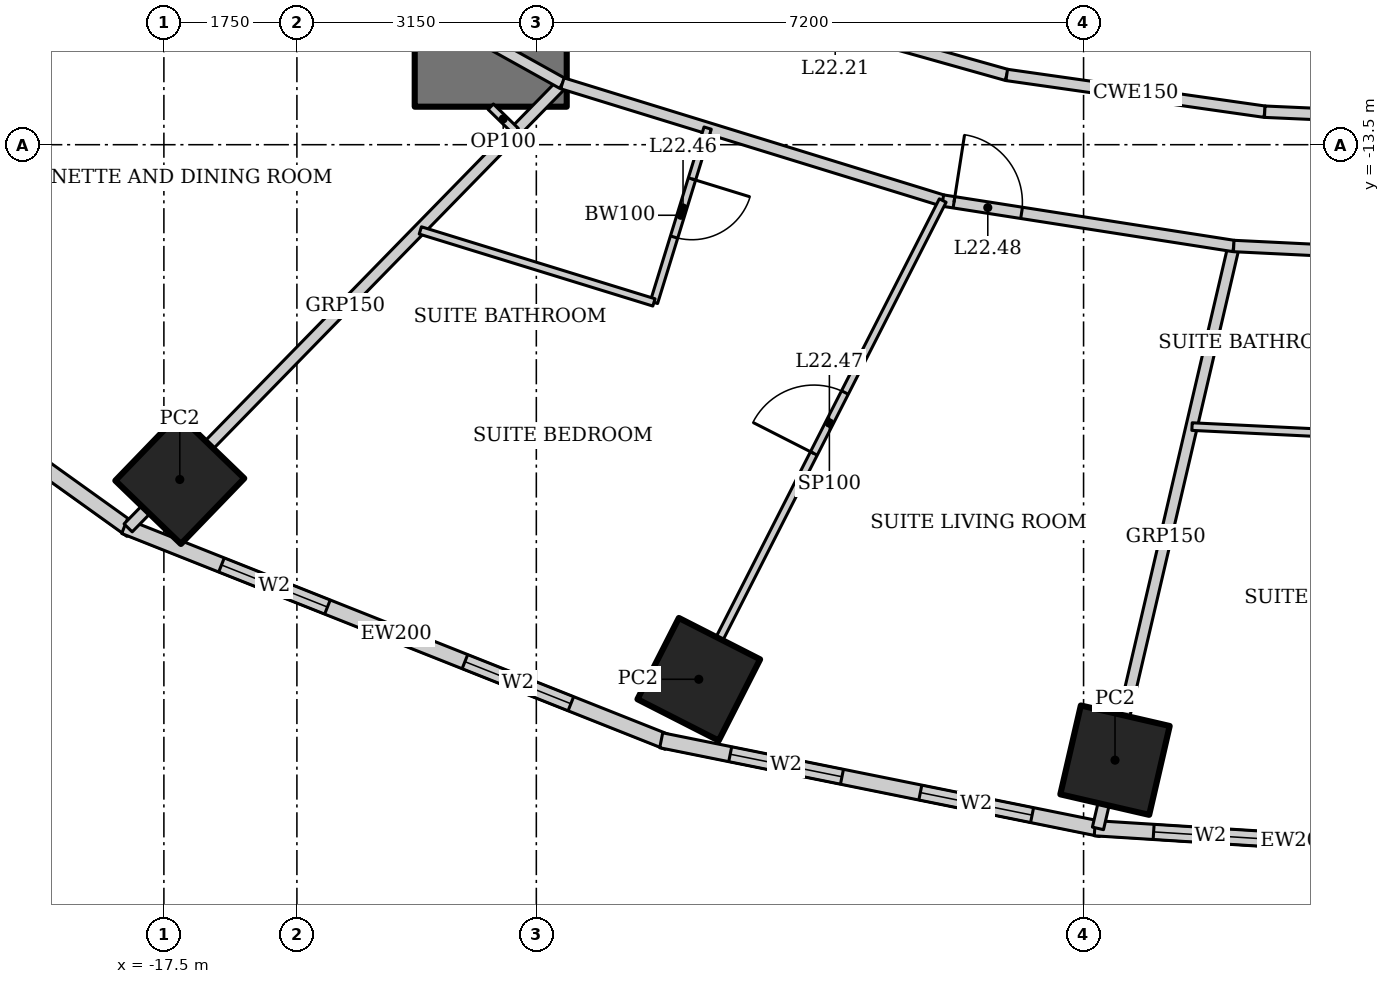
"""IFC4 building model, lengths in metres.
Left out: names, types, materials, properties, quantities, classifications, styles, units other than length and angle.
Written with IfcOpenShell. Run it as: python <this file> out.ifc"""

import sys

from ifc_helpers import new_model, si_unit, direction, frame, frame_2d, origin, origin_2d, place, context, subcontext, project, spatial, rectangle, hollow_rectangle, extrude, element, fill, save


model = new_model("IFC4")
c1 = context("Model", 3, precision=1e-05, world=origin(), true_north=direction((0.0, 1.0)))
c2 = subcontext(c1, "Body", "Model", "MODEL_VIEW")
j1 = project(units=[si_unit("LENGTHUNIT", "METRE"), si_unit("PLANEANGLEUNIT", "RADIAN")], contexts=[c1])
p1 = place(None, origin())
s1 = spatial("IfcSite", under=j1, at=p1, CompositionType="ELEMENT")
p2 = place(p1, origin())
s2 = spatial("IfcBuilding", under=s1, at=p2, CompositionType="ELEMENT")
p3 = place(p2, frame((0.0, 0.0, 94.6)))
s3 = spatial("IfcBuildingStorey", under=s2, at=p3, CompositionType="ELEMENT", Elevation=94.6)
for number, where, z_axis, x_axis in (
    (1, (-17.291, -17.905, 0.0), (0.0, 0.0, 1.0), (0.695, 0.719, 0.0)),
    (2, (-10.463, -20.534, 0.0), (0.0, 0.0, 1.0), (0.454, 0.891, 0.0)),
    (3, (-4.986, -21.598, 0.0), (0.0, 0.0, 1.0), (0.225, 0.974, 0.0)),
):
    element("IfcColumn", number, at=place(p3, frame(where, z_axis=z_axis, x_axis=x_axis)), inside=s3, PredefinedType="COLUMN", context=c2, shape_type="SweptSolid", body=[
        extrude(hollow_rectangle(XDim=1.2, YDim=1.2, WallThickness=0.1, at=origin_2d()), origin(), (0.0, 0.0, 1.0), 3.6),
    ])
p4 = place(p3, frame((-13.2, 13.0, 0.0), z_axis=(0.0, 0.0, 1.0), x_axis=(0.0, -1.0, 0.0)))
e4 = element("IfcWall", 4, at=p4, inside=s3, PredefinedType="SHEAR", context=c2, shape_type="SweptSolid", body=[
    extrude(rectangle(XDim=26.0, YDim=2.0, at=frame_2d((13.0, 0.0))), origin(), (0.0, 0.0, 1.0), 3.6),
])
p5 = place(p4, frame((12.1, 0.0, 0.0)))
e5 = element("IfcOpeningElement", 5, at=p5, cuts=e4, PredefinedType="OPENING", context=c2, shape_type="SweptSolid", body=[
    extrude(rectangle(XDim=1.8, YDim=2.1, at=frame_2d((0.9, 1.05))), frame((0.0, 1.01, 0.0), z_axis=(0.0, -1.0, 0.0), x_axis=(1.0, 0.0, 0.0)), (0.0, 0.0, 1.0), 2.02),
])
p6 = place(p3, frame((-24.482, -13.875, 0.0), z_axis=(0.0, 0.0, 1.0), x_axis=(0.812791321576, -0.582554948112, 0.0)))
e6 = element("IfcWall", 6, at=p6, inside=s3, PredefinedType="SOLIDWALL", context=c2, shape_type="SweptSolid", body=[
    extrude(rectangle(XDim=8.063, YDim=0.2, at=frame_2d((4.032, 0.0))), origin(), (0.0, 0.0, 1.0), 3.45),
])
p7 = place(p6, frame((1.466, 0.0, 0.5)))
e7 = element("IfcOpeningElement", 7, at=p7, cuts=e6, PredefinedType="OPENING", context=c2, shape_type="SweptSolid", body=[
    extrude(rectangle(XDim=1.5, YDim=2.2, at=frame_2d((0.75, 1.1))), frame((0.0, 0.11, 0.0), z_axis=(0.0, -1.0, 0.0), x_axis=(1.0, 0.0, 0.0)), (0.0, 0.0, 1.0), 0.22),
])
p8 = place(p6, frame((5.097, 0.0, 0.5)))
e8 = element("IfcOpeningElement", 8, at=p8, cuts=e6, PredefinedType="OPENING", context=c2, shape_type="SweptSolid", body=[
    extrude(rectangle(XDim=1.5, YDim=2.2, at=frame_2d((0.75, 1.1))), frame((0.0, 0.11, 0.0), z_axis=(0.0, -1.0, 0.0), x_axis=(1.0, 0.0, 0.0)), (0.0, 0.0, 1.0), 0.22),
])
p9 = place(p3, frame((-18.018, -18.523, 0.0), z_axis=(0.0, 0.0, 1.0), x_axis=(0.929358351251, -0.369178892895, 0.0)))
e9 = element("IfcWall", 9, at=p9, inside=s3, PredefinedType="SOLIDWALL", context=c2, shape_type="SweptSolid", body=[
    extrude(rectangle(XDim=7.692, YDim=0.2, at=frame_2d((3.846, 0.0))), origin(), (0.0, 0.0, 1.0), 3.45),
])
p10 = place(p9, frame((1.373, 0.0, 0.5)))
e10 = element("IfcOpeningElement", 10, at=p10, cuts=e9, PredefinedType="OPENING", context=c2, shape_type="SweptSolid", body=[
    extrude(rectangle(XDim=1.5, YDim=2.2, at=frame_2d((0.75, 1.1))), frame((0.0, 0.11, 0.0), z_axis=(0.0, -1.0, 0.0), x_axis=(1.0, 0.0, 0.0)), (0.0, 0.0, 1.0), 0.22),
])
p11 = place(p9, frame((4.819, 0.0, 0.5)))
e11 = element("IfcOpeningElement", 11, at=p11, cuts=e9, PredefinedType="OPENING", context=c2, shape_type="SweptSolid", body=[
    extrude(rectangle(XDim=1.5, YDim=2.2, at=frame_2d((0.75, 1.1))), frame((0.0, 0.11, 0.0), z_axis=(0.0, -1.0, 0.0), x_axis=(1.0, 0.0, 0.0)), (0.0, 0.0, 1.0), 0.22),
])
p12 = place(p3, frame((-10.957, -21.337, 0.0), z_axis=(0.0, 0.0, 1.0), x_axis=(0.980251657452, -0.197754110105, 0.0)))
e12 = element("IfcWall", 12, at=p12, inside=s3, PredefinedType="SOLIDWALL", context=c2, shape_type="SweptSolid", body=[
    extrude(rectangle(XDim=5.904, YDim=0.2, at=frame_2d((2.952, 0.0))), origin(), (0.0, 0.0, 1.0), 3.45),
])
p13 = place(p12, frame((0.926, 0.0, 0.5)))
e13 = element("IfcOpeningElement", 13, at=p13, cuts=e12, PredefinedType="OPENING", context=c2, shape_type="SweptSolid", body=[
    extrude(rectangle(XDim=1.5, YDim=2.2, at=frame_2d((0.75, 1.1))), frame((0.0, 0.11, 0.0), z_axis=(0.0, -1.0, 0.0), x_axis=(1.0, 0.0, 0.0)), (0.0, 0.0, 1.0), 0.22),
])
p14 = place(p12, frame((3.478, 0.0, 0.5)))
e14 = element("IfcOpeningElement", 14, at=p14, cuts=e12, PredefinedType="OPENING", context=c2, shape_type="SweptSolid", body=[
    extrude(rectangle(XDim=1.5, YDim=2.2, at=frame_2d((0.75, 1.1))), frame((0.0, 0.11, 0.0), z_axis=(0.0, -1.0, 0.0), x_axis=(1.0, 0.0, 0.0)), (0.0, 0.0, 1.0), 0.22),
])
p15 = place(p3, frame((-5.253, -22.493, 0.0), z_axis=(0.0, 0.0, 1.0), x_axis=(0.998018582375, -0.062919863585, 0.0)))
e15 = element("IfcWall", 15, at=p15, inside=s3, PredefinedType="SOLIDWALL", context=c2, shape_type="SweptSolid", body=[
    extrude(rectangle(XDim=5.304, YDim=0.2, at=frame_2d((2.652, 0.0))), origin(), (0.0, 0.0, 1.0), 3.45),
])
p16 = place(p15, frame((0.776, 0.0, 0.5)))
e16 = element("IfcOpeningElement", 16, at=p16, cuts=e15, PredefinedType="OPENING", context=c2, shape_type="SweptSolid", body=[
    extrude(rectangle(XDim=1.5, YDim=2.2, at=frame_2d((0.75, 1.1))), frame((0.0, 0.11, 0.0), z_axis=(0.0, -1.0, 0.0), x_axis=(1.0, 0.0, 0.0)), (0.0, 0.0, 1.0), 0.22),
])
p17 = place(p15, frame((3.028, 0.0, 0.5)))
e17 = element("IfcOpeningElement", 17, at=p17, cuts=e15, PredefinedType="OPENING", context=c2, shape_type="SweptSolid", body=[
    extrude(rectangle(XDim=1.5, YDim=2.2, at=frame_2d((0.75, 1.1))), frame((0.0, 0.11, 0.0), z_axis=(0.0, -1.0, 0.0), x_axis=(1.0, 0.0, 0.0)), (0.0, 0.0, 1.0), 0.22),
])
p18 = place(p3, frame((-17.97, -18.542, 0.0), z_axis=(0.0, 0.0, 1.0), x_axis=(0.698757291878, 0.715358823981, 0.0)))
e18 = element("IfcWall", 18, at=p18, inside=s3, PredefinedType="PARTITIONING", context=c2, shape_type="SweptSolid", body=[
    extrude(rectangle(XDim=8.177, YDim=0.15, at=frame_2d((4.088, 0.0))), origin(), (0.0, 0.0, 1.0), 2.528),
])
p19 = place(p3, frame((-5.211, -22.496, 0.0), z_axis=(0.0, 0.0, 1.0), x_axis=(0.227056984461, 0.973881474209, 0.0)))
e19 = element("IfcWall", 19, at=p19, inside=s3, PredefinedType="PARTITIONING", context=c2, shape_type="SweptSolid", body=[
    extrude(rectangle(XDim=7.869, YDim=0.15, at=frame_2d((3.934, 0.0))), origin(), (0.0, 0.0, 1.0), 2.767),
])
p20 = place(p3, frame((-17.299, -9.885, 0.0), z_axis=(0.0, 0.0, 1.0), x_axis=(0.873695910579, -0.486472461541, 0.0)))
e20 = element("IfcWall", 20, at=p20, inside=s3, PredefinedType="PARTITIONING", context=c2, shape_type="SweptSolid", body=[
    extrude(rectangle(XDim=5.771, YDim=0.15, at=frame_2d((2.885, 0.0))), origin(), (0.0, 0.0, 1.0), 3.45),
])
p21 = place(p3, frame((-12.257, -12.693, 0.0), z_axis=(0.0, 0.0, 1.0), x_axis=(0.955657956744, -0.294478980085, 0.0)))
e21 = element("IfcWall", 21, at=p21, inside=s3, PredefinedType="PARTITIONING", context=c2, shape_type="SweptSolid", body=[
    extrude(rectangle(XDim=5.236, YDim=0.15, at=frame_2d((2.618, 0.0))), origin(), (0.0, 0.0, 1.0), 3.45),
])
p22 = place(p3, frame((-7.253, -14.235, 0.0), z_axis=(0.0, 0.0, 1.0), x_axis=(0.988015036573, -0.154357660987, 0.0)))
e22 = element("IfcWall", 22, at=p22, inside=s3, PredefinedType="PARTITIONING", context=c2, shape_type="SweptSolid", body=[
    extrude(rectangle(XDim=3.875, YDim=0.15, at=frame_2d((1.938, 0.0))), origin(), (0.0, 0.0, 1.0), 3.45),
])
p23 = place(p22, frame((0.15, 0.0, 0.0)))
e23 = element("IfcOpeningElement", 23, at=p23, cuts=e22, PredefinedType="OPENING", context=c2, shape_type="SweptSolid", body=[
    extrude(rectangle(XDim=0.9, YDim=2.1, at=frame_2d((0.45, 1.05))), frame((0.0, 0.085, 0.0), z_axis=(0.0, -1.0, 0.0), x_axis=(1.0, 0.0, 0.0)), (0.0, 0.0, 1.0), 0.17),
])
p24 = place(p3, frame((-3.424, -14.833, 0.0), z_axis=(0.0, 0.0, 1.0), x_axis=(0.998809560203, -0.048779733975, 0.0)))
e24 = element("IfcWall", 24, at=p24, inside=s3, PredefinedType="PARTITIONING", context=c2, shape_type="SweptSolid", body=[
    extrude(rectangle(XDim=3.428, YDim=0.15, at=frame_2d((1.714, 0.0))), origin(), (0.0, 0.0, 1.0), 3.45),
])
p25 = place(p3, frame((-10.924, -11.312, 0.0), z_axis=(0.0, 0.0, 1.0), x_axis=(0.962643729928, -0.270771211967, 0.0)))
e25 = element("IfcWall", 25, at=p25, inside=s3, PredefinedType="PARTITIONING", context=c2, shape_type="SweptSolid", body=[
    extrude(rectangle(XDim=4.688, YDim=0.15, at=frame_2d((2.344, 0.0))), origin(), (0.0, 0.0, 1.0), 3.45),
])
p26 = place(p25, frame((1.894, 0.0, 0.0)))
e26 = element("IfcOpeningElement", 26, at=p26, cuts=e25, PredefinedType="OPENING", context=c2, shape_type="SweptSolid", body=[
    extrude(rectangle(XDim=0.9, YDim=2.1, at=frame_2d((0.45, 1.05))), frame((0.0, 0.085, 0.0), z_axis=(0.0, -1.0, 0.0), x_axis=(1.0, 0.0, 0.0)), (0.0, 0.0, 1.0), 0.17),
])
p27 = place(p3, frame((-6.411, -12.582, 0.0), z_axis=(0.0, 0.0, 1.0), x_axis=(0.990002114939, -0.14105251652, 0.0)))
e27 = element("IfcWall", 27, at=p27, inside=s3, PredefinedType="PARTITIONING", context=c2, shape_type="SweptSolid", body=[
    extrude(rectangle(XDim=3.429, YDim=0.15, at=frame_2d((1.714, 0.0))), origin(), (0.0, 0.0, 1.0), 3.45),
])
p28 = place(p3, frame((-23.171, -13.24, 0.0), z_axis=(0.0, 0.0, 1.0), x_axis=(0.868249806728, 0.496127275118, 0.0)))
e28 = element("IfcWall", 28, at=p28, inside=s3, PredefinedType="PARTITIONING", context=c2, shape_type="SweptSolid", body=[
    extrude(rectangle(XDim=6.763, YDim=0.1, at=frame_2d((3.381, 0.0))), origin(), (0.0, 0.0, 1.0), 2.693),
])
p29 = place(p28, frame((2.931, 0.0, 0.0)))
e29 = element("IfcOpeningElement", 29, at=p29, cuts=e28, PredefinedType="OPENING", context=c2, shape_type="SweptSolid", body=[
    extrude(rectangle(XDim=0.9, YDim=2.1, at=frame_2d((0.45, 1.05))), frame((0.0, 0.06, 0.0), z_axis=(0.0, -1.0, 0.0), x_axis=(1.0, 0.0, 0.0)), (0.0, 0.0, 1.0), 0.12),
])
p30 = place(p3, frame((-10.346, -13.281, 0.0), z_axis=(0.0, 0.0, 1.0), x_axis=(-0.294478957423, -0.955657963727, 0.0)))
e30 = element("IfcWall", 30, at=p30, inside=s3, PredefinedType="PARTITIONING", context=c2, shape_type="SweptSolid", body=[
    extrude(rectangle(XDim=2.4, YDim=0.1, at=frame_2d((1.2, 0.0))), origin(), (0.0, 0.0, 1.0), 3.45),
])
p31 = place(p30, frame((0.7, 0.0, 0.0)))
e31 = element("IfcOpeningElement", 31, at=p31, cuts=e30, PredefinedType="OPENING", context=c2, shape_type="SweptSolid", body=[
    extrude(rectangle(XDim=0.8, YDim=2.1, at=frame_2d((0.4, 1.05))), frame((0.0, 0.06, 0.0), z_axis=(0.0, -1.0, 0.0), x_axis=(1.0, 0.0, 0.0)), (0.0, 0.0, 1.0), 0.12),
])
p32 = place(p3, frame((-11.052, -15.575, 0.0), z_axis=(0.0, 0.0, 1.0), x_axis=(-0.955641033268, 0.294533895391, 0.0)))
e32 = element("IfcWall", 32, at=p32, inside=s3, PredefinedType="PARTITIONING", context=c2, shape_type="SweptSolid", body=[
    extrude(rectangle(XDim=3.216, YDim=0.1, at=frame_2d((1.608, 0.0))), origin(), (0.0, 0.0, 1.0), 3.45),
])
p33 = place(p3, frame((-10.236, -20.088, 0.0), z_axis=(0.0, 0.0, 1.0), x_axis=(0.453993694696, 0.89100489627, 0.0)))
e33 = element("IfcWall", 33, at=p33, inside=s3, PredefinedType="PARTITIONING", context=c2, shape_type="SweptSolid", body=[
    extrude(rectangle(XDim=6.57, YDim=0.1, at=frame_2d((3.285, 0.0))), origin(), (0.0, 0.0, 1.0), 2.528),
])
p34 = place(p33, frame((2.835, 0.0, 0.0)))
e34 = element("IfcOpeningElement", 34, at=p34, cuts=e33, PredefinedType="OPENING", context=c2, shape_type="SweptSolid", body=[
    extrude(rectangle(XDim=0.9, YDim=2.1, at=frame_2d((0.45, 1.05))), frame((0.0, 0.06, 0.0), z_axis=(0.0, -1.0, 0.0), x_axis=(1.0, 0.0, 0.0)), (0.0, 0.0, 1.0), 0.12),
])
p35 = place(p3, frame((-1.544, -17.327, 0.0), z_axis=(0.0, 0.0, 1.0), x_axis=(-0.998813899717, 0.048690797202, 0.0)))
e35 = element("IfcWall", 35, at=p35, inside=s3, PredefinedType="PARTITIONING", context=c2, shape_type="SweptSolid", body=[
    extrude(rectangle(XDim=2.432, YDim=0.1, at=frame_2d((1.216, 0.0))), origin(), (0.0, 0.0, 1.0), 3.45),
])
p36 = place(p3, frame((-13.2, -13.0, 0.0), z_axis=(0.0, 0.0, 1.0), x_axis=(0.715289751842, -0.698827998087, 0.0)))
e36 = element("IfcWall", 36, at=p36, inside=s3, PredefinedType="PARTITIONING", context=c2, shape_type="SweptSolid", body=[
    extrude(rectangle(XDim=0.46, YDim=0.1, at=frame_2d((0.23, 0.0))), origin(), (0.0, 0.0, 1.0), 3.45),
])
p37 = place(p3, frame((-3.016, -13.066, 0.0), z_axis=(0.0, 0.0, 1.0), x_axis=(0.999010128674, -0.044483286824, 0.0)))
e37 = element("IfcWall", 37, at=p37, inside=s3, PredefinedType="PARTITIONING", context=c2, shape_type="SweptSolid", body=[
    extrude(rectangle(XDim=0.982, YDim=0.15, at=frame_2d((0.491, 0.0))), origin(), (0.0, 0.0, 1.0), 3.45),
])
p38 = place(p10, origin())
e38 = element("IfcWindow", 38, at=p38, inside=s3, PartitioningType="SINGLE_PANEL", PredefinedType="WINDOW", context=c2, shape_type="SweptSolid", body=[
    extrude(rectangle(XDim=1.5, YDim=2.2, at=frame_2d((0.75, 1.1))), frame((0.0, 0.03, 0.0), z_axis=(0.0, -1.0, 0.0), x_axis=(1.0, 0.0, 0.0)), (0.0, 0.0, 1.0), 0.06),
])
fill(e10, e38)
p39 = place(p11, origin())
e39 = element("IfcWindow", 39, at=p39, inside=s3, PartitioningType="SINGLE_PANEL", PredefinedType="WINDOW", context=c2, shape_type="SweptSolid", body=[
    extrude(rectangle(XDim=1.5, YDim=2.2, at=frame_2d((0.75, 1.1))), frame((0.0, 0.03, 0.0), z_axis=(0.0, -1.0, 0.0), x_axis=(1.0, 0.0, 0.0)), (0.0, 0.0, 1.0), 0.06),
])
fill(e11, e39)
p40 = place(p13, origin())
e40 = element("IfcWindow", 40, at=p40, inside=s3, PartitioningType="SINGLE_PANEL", PredefinedType="WINDOW", context=c2, shape_type="SweptSolid", body=[
    extrude(rectangle(XDim=1.5, YDim=2.2, at=frame_2d((0.75, 1.1))), frame((0.0, 0.03, 0.0), z_axis=(0.0, -1.0, 0.0), x_axis=(1.0, 0.0, 0.0)), (0.0, 0.0, 1.0), 0.06),
])
fill(e13, e40)
p41 = place(p14, origin())
e41 = element("IfcWindow", 41, at=p41, inside=s3, PartitioningType="SINGLE_PANEL", PredefinedType="WINDOW", context=c2, shape_type="SweptSolid", body=[
    extrude(rectangle(XDim=1.5, YDim=2.2, at=frame_2d((0.75, 1.1))), frame((0.0, 0.03, 0.0), z_axis=(0.0, -1.0, 0.0), x_axis=(1.0, 0.0, 0.0)), (0.0, 0.0, 1.0), 0.06),
])
fill(e14, e41)
p42 = place(p16, origin())
e42 = element("IfcWindow", 42, at=p42, inside=s3, PartitioningType="SINGLE_PANEL", PredefinedType="WINDOW", context=c2, shape_type="SweptSolid", body=[
    extrude(rectangle(XDim=1.5, YDim=2.2, at=frame_2d((0.75, 1.1))), frame((0.0, 0.03, 0.0), z_axis=(0.0, -1.0, 0.0), x_axis=(1.0, 0.0, 0.0)), (0.0, 0.0, 1.0), 0.06),
])
fill(e16, e42)
p43 = place(p31, origin())
e43 = element("IfcDoor", 43, at=p43, inside=s3, OperationType="SINGLE_SWING_LEFT", PredefinedType="DOOR", context=c2, shape_type="SweptSolid", body=[
    extrude(rectangle(XDim=0.8, YDim=2.1, at=frame_2d((0.4, 1.05))), frame((0.0, 0.025, 0.0), z_axis=(0.0, -1.0, 0.0), x_axis=(1.0, 0.0, 0.0)), (0.0, 0.0, 1.0), 0.05),
])
fill(e31, e43)
p44 = place(p34, origin())
e44 = element("IfcDoor", 44, at=p44, inside=s3, OperationType="SINGLE_SWING_LEFT", PredefinedType="DOOR", context=c2, shape_type="SweptSolid", body=[
    extrude(rectangle(XDim=0.9, YDim=2.1, at=frame_2d((0.45, 1.05))), frame((0.0, 0.025, 0.0), z_axis=(0.0, -1.0, 0.0), x_axis=(1.0, 0.0, 0.0)), (0.0, 0.0, 1.0), 0.05),
])
fill(e34, e44)
p45 = place(p23, origin())
e45 = element("IfcDoor", 45, at=p45, inside=s3, OperationType="SINGLE_SWING_LEFT", PredefinedType="DOOR", context=c2, shape_type="SweptSolid", body=[
    extrude(rectangle(XDim=0.9, YDim=2.1, at=frame_2d((0.45, 1.05))), frame((0.0, 0.025, 0.0), z_axis=(0.0, -1.0, 0.0), x_axis=(1.0, 0.0, 0.0)), (0.0, 0.0, 1.0), 0.05),
])
fill(e23, e45)
save(model, sys.argv[1])
